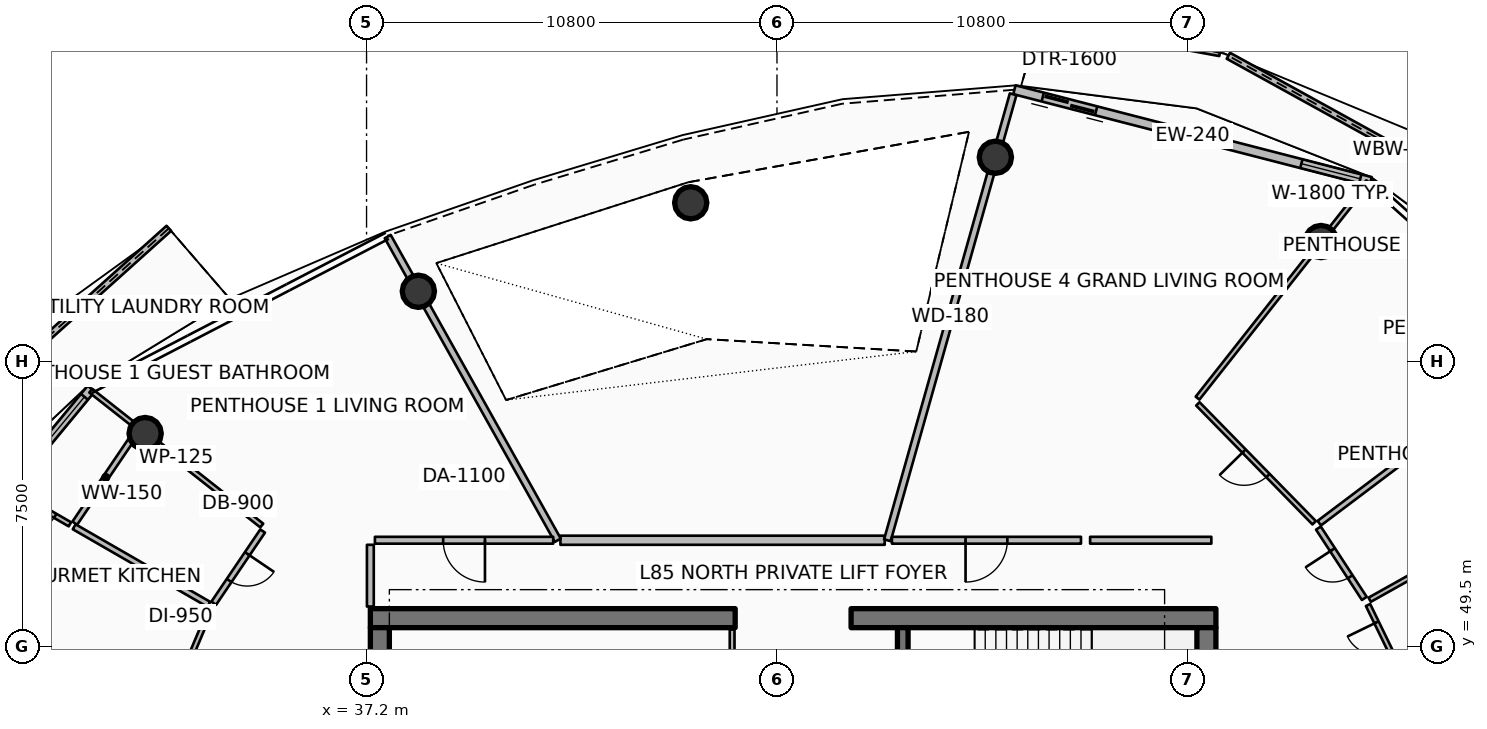
"""IFC4 building model, lengths in metres.
Left out: names, types, materials, properties, quantities, classifications, styles, units other than length and angle.
Written with IfcOpenShell. Run it as: python <this file> out.ifc"""

import sys

from ifc_helpers import new_model, si_unit, direction, frame, frame_2d, origin, origin_2d, place, context, subcontext, project, spatial, polyline, rectangle, circle, outline, extrude, element, fill, save


model = new_model("IFC4")
c1 = context("Model", 3, precision=1e-05, world=origin(), true_north=direction((0.0, 1.0)))
c2 = subcontext(c1, "Body", "Model", "MODEL_VIEW")
j1 = project(units=[si_unit("LENGTHUNIT", "METRE"), si_unit("PLANEANGLEUNIT", "RADIAN")], contexts=[c1])
p1 = place(None, origin())
s1 = spatial("IfcSite", under=j1, at=p1, CompositionType="ELEMENT")
p2 = place(p1, origin())
s2 = spatial("IfcBuilding", under=s1, at=p2, CompositionType="ELEMENT")
p3 = place(p2, frame((0.0, 0.0, 338.9)))
s3 = spatial("IfcBuildingStorey", under=s2, at=p3, CompositionType="ELEMENT", Elevation=338.9)
p4 = place(p3, frame((37.3, 50.25, 0.0), z_axis=(0.0, 0.0, 1.0), x_axis=(1.0, 0.0, 0.0)))
e1 = element("IfcWall", 1, at=p4, inside=s3, PredefinedType="SHEAR", context=c2, shape_type="SweptSolid", body=[
    extrude(rectangle(XDim=9.6, YDim=0.5, at=frame_2d((4.8, 0.0))), origin(), (0.0, 0.0, 1.0), 4.2),
])
p5 = place(p3, frame((49.95, 50.25, 0.0), z_axis=(0.0, 0.0, 1.0), x_axis=(1.0, 0.0, 0.0)))
e2 = element("IfcWall", 2, at=p5, inside=s3, PredefinedType="SHEAR", context=c2, shape_type="SweptSolid", body=[
    extrude(rectangle(XDim=9.6, YDim=0.5, at=frame_2d((4.8, 0.0))), origin(), (0.0, 0.0, 1.0), 4.2),
])
for number, where, z_axis, x_axis in (
    (3, (37.55, 34.0, 0.0), (0.0, 0.0, 1.0), (0.0, 1.0, 0.0)),
    (4, (59.3, 34.0, 0.0), (0.0, 0.0, 1.0), (0.0, 1.0, 0.0)),
):
    element("IfcWall", number, at=place(p3, frame(where, z_axis=z_axis, x_axis=x_axis)), inside=s3, PredefinedType="SHEAR", context=c2, shape_type="SweptSolid", body=[
        extrude(rectangle(XDim=16.0, YDim=0.5, at=frame_2d((8.0, 0.0))), origin(), (0.0, 0.0, 1.0), 4.2),
    ])
p6 = place(p3, frame((51.31, 46.5, 0.0), z_axis=(0.0, 0.0, 1.0), x_axis=(0.0, 1.0, 0.0)))
e5 = element("IfcWall", 5, at=p6, inside=s3, PredefinedType="SHEAR", context=c2, shape_type="SweptSolid", body=[
    extrude(rectangle(XDim=3.5, YDim=0.28, at=frame_2d((1.75, 0.0))), origin(), (0.0, 0.0, 1.0), 4.2),
])
for number, where, z_axis, x_axis in (
    (6, (62.316, 60.159, 0.0), (0.0, 0.0, 1.0), (1.0, 0.0, 0.0)),
    (7, (53.747, 62.376, 0.0), (0.0, 0.0, 1.0), (1.0, 0.0, 0.0)),
    (8, (45.73, 61.179, 0.0), (0.0, 0.0, 1.0), (1.0, 0.0, 0.0)),
    (9, (38.563, 58.851, 0.0), (0.0, 0.0, 1.0), (1.0, 0.0, 0.0)),
    (10, (31.374, 55.107, 0.0), (0.0, 0.0, 1.0), (1.0, 0.0, 0.0)),
):
    element("IfcColumn", number, at=place(p3, frame(where, z_axis=z_axis, x_axis=x_axis)), inside=s3, PredefinedType="COLUMN", context=c2, shape_type="SweptSolid", body=[
        extrude(circle(Radius=0.425, at=origin_2d()), origin(), (0.0, 0.0, 1.0), 3.8),
    ])
p7 = place(p3, frame((68.897, 60.07, 0.0), z_axis=(0.0, 0.0, 1.0), x_axis=(-0.875469817093, 0.483272800145, 0.0)))
e11 = element("IfcWall", 11, at=p7, inside=s3, PredefinedType="PARAPET", context=c2, shape_type="SweptSolid", body=[
    extrude(outline(polyline([(0.0, 0.0), (10.302, 0.0), (10.302, 1.148), (5.151, 1.127), (0.0, 1.224), (0.0, 0.0)])), frame((0.0, 0.09, 0.0), z_axis=(0.0, -1.0, 0.0), x_axis=(1.0, 0.0, 0.0)), (0.0, 0.0, 1.0), 0.18),
])
p8 = place(p3, frame((59.655, 65.128, 0.0), z_axis=(0.0, 0.0, 1.0), x_axis=(-0.983429847583, 0.18128909201, 0.0)))
e12 = element("IfcWall", 12, at=p8, inside=s3, PredefinedType="PARAPET", context=c2, shape_type="SweptSolid", body=[
    extrude(outline(polyline([(0.0, 0.0), (4.808, 0.0), (4.808, 1.279), (0.0, 1.148), (0.0, 0.0)])), frame((0.0, 0.09, 0.0), z_axis=(0.0, -1.0, 0.0), x_axis=(1.0, 0.0, 0.0)), (0.0, 0.0, 1.0), 0.18),
])
p9 = place(p3, frame((31.997, 60.507, 0.0), z_axis=(0.0, 0.0, 1.0), x_axis=(-0.74390919155, -0.668280715514, 0.0)))
e13 = element("IfcWall", 13, at=p9, inside=s3, PredefinedType="PARAPET", context=c2, shape_type="SweptSolid", body=[
    extrude(outline(polyline([(0.0, 0.0), (9.765, 0.0), (9.765, 1.348), (4.883, 1.562), (0.0, 1.747), (0.0, 0.0)])), frame((0.0, 0.09, 0.0), z_axis=(0.0, -1.0, 0.0), x_axis=(1.0, 0.0, 0.0)), (0.0, 0.0, 1.0), 0.18),
])
p10 = place(p3, frame((63.62, 61.74, 0.0), z_axis=(0.0, 0.0, 1.0), x_axis=(-0.968389062354, 0.249444630957, 0.0)))
e14 = element("IfcWall", 14, at=p10, inside=s3, PredefinedType="SOLIDWALL", context=c2, shape_type="SweptSolid", body=[
    extrude(rectangle(XDim=9.678, YDim=0.24, at=frame_2d((4.839, 0.0))), origin(), (0.0, 0.0, 1.0), 2.75),
])
p11 = place(p10, frame((7.458, 0.0, 0.0)))
e15 = element("IfcOpeningElement", 15, at=p11, cuts=e14, PredefinedType="OPENING", context=c2, shape_type="SweptSolid", body=[
    extrude(rectangle(XDim=1.45, YDim=2.15, at=frame_2d((0.725, 1.075))), frame((0.0, 0.13, 0.0), z_axis=(0.0, -1.0, 0.0), x_axis=(1.0, 0.0, 0.0)), (0.0, 0.0, 1.0), 0.26),
])
p12 = place(p10, frame((0.28, 0.0, 0.65)))
e16 = element("IfcOpeningElement", 16, at=p12, cuts=e14, PredefinedType="OPENING", context=c2, shape_type="SweptSolid", body=[
    extrude(rectangle(XDim=1.6, YDim=1.5, at=frame_2d((0.8, 0.75))), frame((0.0, 0.13, 0.0), z_axis=(0.0, -1.0, 0.0), x_axis=(1.0, 0.0, 0.0)), (0.0, 0.0, 1.0), 0.26),
])
p13 = place(p3, frame((29.955, 56.289, 0.0), z_axis=(0.0, 0.0, 1.0), x_axis=(-0.636803612721, -0.771026042897, 0.0)))
e17 = element("IfcWall", 17, at=p13, inside=s3, PredefinedType="SOLIDWALL", context=c2, shape_type="SweptSolid", body=[
    extrude(rectangle(XDim=9.728, YDim=0.24, at=frame_2d((4.864, 0.0))), origin(), (0.0, 0.0, 1.0), 2.75),
])
p14 = place(p13, frame((7.508, 0.0, 0.0)))
e18 = element("IfcOpeningElement", 18, at=p14, cuts=e17, PredefinedType="OPENING", context=c2, shape_type="SweptSolid", body=[
    extrude(rectangle(XDim=1.45, YDim=2.15, at=frame_2d((0.725, 1.075))), frame((0.0, 0.13, 0.0), z_axis=(0.0, -1.0, 0.0), x_axis=(1.0, 0.0, 0.0)), (0.0, 0.0, 1.0), 0.26),
])
p15 = place(p13, frame((0.28, 0.0, 0.65)))
e19 = element("IfcOpeningElement", 19, at=p15, cuts=e17, PredefinedType="OPENING", context=c2, shape_type="SweptSolid", body=[
    extrude(rectangle(XDim=1.6, YDim=1.5, at=frame_2d((0.8, 0.75))), frame((0.0, 0.13, 0.0), z_axis=(0.0, -1.0, 0.0), x_axis=(1.0, 0.0, 0.0)), (0.0, 0.0, 1.0), 0.26),
])
p16 = place(p3, frame((46.82, 47.92, 0.0), z_axis=(0.0, 0.0, 1.0), x_axis=(0.0, 1.0, 0.0)))
e20 = element("IfcWall", 20, at=p16, inside=s3, PredefinedType="PARTITIONING", context=c2, shape_type="SweptSolid", body=[
    extrude(rectangle(XDim=2.03, YDim=0.125, at=frame_2d((1.015, 0.0))), origin(), (0.0, 0.0, 1.0), 3.24),
])
p17 = place(p3, frame((50.835, 52.3, 0.0), z_axis=(0.0, 0.0, 1.0), x_axis=(-1.0, 0.0, 0.0)))
e21 = element("IfcWall", 21, at=p17, inside=s3, PredefinedType="SOLIDWALL", context=c2, shape_type="SweptSolid", body=[
    extrude(rectangle(XDim=8.533, YDim=0.24, at=frame_2d((4.267, 0.0))), origin(), (0.0, 0.0, 1.0), 3.24),
])
p18 = place(p3, frame((50.905, 52.3, 0.0), z_axis=(0.0, 0.0, 1.0), x_axis=(0.271453030279, 0.962451688321, 0.0)))
e22 = element("IfcWall", 22, at=p18, inside=s3, PredefinedType="PARTITIONING", context=c2, shape_type="SweptSolid", body=[
    extrude(rectangle(XDim=12.191, YDim=0.18, at=frame_2d((6.096, 0.0))), origin(), (0.0, 0.0, 1.0), 3.24),
])
p19 = place(p3, frame((42.232, 52.3, 0.0), z_axis=(0.0, 0.0, 1.0), x_axis=(-0.488623665245, 0.872494649704, 0.0)))
e23 = element("IfcWall", 23, at=p19, inside=s3, PredefinedType="PARTITIONING", context=c2, shape_type="SweptSolid", body=[
    extrude(rectangle(XDim=9.157, YDim=0.18, at=frame_2d((4.579, 0.0))), origin(), (0.0, 0.0, 1.0), 3.24),
])
p20 = place(p3, frame((42.112, 52.3, 0.0), z_axis=(0.0, 0.0, 1.0), x_axis=(-1.0, 0.0, 0.0)))
e24 = element("IfcWall", 24, at=p20, inside=s3, PredefinedType="PARTITIONING", context=c2, shape_type="SweptSolid", body=[
    extrude(rectangle(XDim=4.692, YDim=0.18, at=frame_2d((2.346, 0.0))), origin(), (0.0, 0.0, 1.0), 3.24),
])
p21 = place(p20, frame((1.796, 0.0, 0.0)))
e25 = element("IfcOpeningElement", 25, at=p21, cuts=e24, PredefinedType="OPENING", context=c2, shape_type="SweptSolid", body=[
    extrude(rectangle(XDim=1.1, YDim=2.1, at=frame_2d((0.55, 1.05))), frame((0.0, 0.1, 0.0), z_axis=(0.0, -1.0, 0.0), x_axis=(1.0, 0.0, 0.0)), (0.0, 0.0, 1.0), 0.2),
])
p22 = place(p3, frame((37.3, 52.18, 0.0), z_axis=(0.0, 0.0, 1.0), x_axis=(0.0, -1.0, 0.0)))
e26 = element("IfcWall", 26, at=p22, inside=s3, PredefinedType="PARTITIONING", context=c2, shape_type="SweptSolid", body=[
    extrude(rectangle(XDim=1.625, YDim=0.18, at=frame_2d((0.812, 0.0))), origin(), (0.0, 0.0, 1.0), 3.24),
])
p23 = place(p3, frame((34.443, 52.688, 0.0), z_axis=(0.0, 0.0, 1.0), x_axis=(-0.785329715116, 0.61907773224, 0.0)))
e27 = element("IfcWall", 27, at=p23, inside=s3, PredefinedType="PARTITIONING", context=c2, shape_type="SweptSolid", body=[
    extrude(rectangle(XDim=5.73, YDim=0.125, at=frame_2d((2.865, 0.0))), origin(), (0.0, 0.0, 1.0), 3.24),
])
p24 = place(p3, frame((34.466, 52.543, 0.0), z_axis=(0.0, 0.0, 1.0), x_axis=(-0.560627016922, -0.828068443969, 0.0)))
e28 = element("IfcWall", 28, at=p24, inside=s3, PredefinedType="PARTITIONING", context=c2, shape_type="SweptSolid", body=[
    extrude(rectangle(XDim=2.295, YDim=0.15, at=frame_2d((1.147, 0.0))), origin(), (0.0, 0.0, 1.0), 3.24),
])
p25 = place(p24, frame((0.722, 0.0, 0.0)))
e29 = element("IfcOpeningElement", 29, at=p25, cuts=e28, PredefinedType="OPENING", context=c2, shape_type="SweptSolid", body=[
    extrude(rectangle(XDim=0.85, YDim=2.06, at=frame_2d((0.425, 1.03))), frame((0.0, 0.085, 0.0), z_axis=(0.0, -1.0, 0.0), x_axis=(1.0, 0.0, 0.0)), (0.0, 0.0, 1.0), 0.17),
])
p26 = place(p3, frame((31.152, 55.155, 0.0), z_axis=(0.0, 0.0, 1.0), x_axis=(-0.560638207203, -0.828060867705, 0.0)))
e30 = element("IfcWall", 30, at=p26, inside=s3, PredefinedType="PARTITIONING", context=c2, shape_type="SweptSolid", body=[
    extrude(rectangle(XDim=2.906, YDim=0.15, at=frame_2d((1.453, 0.0))), origin(), (0.0, 0.0, 1.0), 3.24),
])
p27 = place(p3, frame((33.051, 50.613, 0.0), z_axis=(0.0, 0.0, 1.0), x_axis=(-0.866485544891, 0.499202163952, 0.0)))
e31 = element("IfcWall", 31, at=p27, inside=s3, PredefinedType="PARTITIONING", context=c2, shape_type="SweptSolid", body=[
    extrude(rectangle(XDim=4.09, YDim=0.15, at=frame_2d((2.045, 0.0))), origin(), (0.0, 0.0, 1.0), 3.24),
])
p28 = place(p3, frame((29.394, 52.719, 0.0), z_axis=(0.0, 0.0, 1.0), x_axis=(-0.866486493133, 0.499200518047, 0.0)))
e32 = element("IfcWall", 32, at=p28, inside=s3, PredefinedType="PARTITIONING", context=c2, shape_type="SweptSolid", body=[
    extrude(rectangle(XDim=1.741, YDim=0.125, at=frame_2d((0.871, 0.0))), origin(), (0.0, 0.0, 1.0), 3.24),
])
p29 = place(p28, frame((0.446, 0.0, 0.0)))
e33 = element("IfcOpeningElement", 33, at=p29, cuts=e32, PredefinedType="OPENING", context=c2, shape_type="SweptSolid", body=[
    extrude(rectangle(XDim=0.85, YDim=2.06, at=frame_2d((0.425, 1.03))), frame((0.0, 0.073, 0.0), z_axis=(0.0, -1.0, 0.0), x_axis=(1.0, 0.0, 0.0)), (0.0, 0.0, 1.0), 0.145),
])
p30 = place(p3, frame((33.094, 50.485, 0.0), z_axis=(0.0, 0.0, 1.0), x_axis=(-0.388261704365, -0.921549157085, 0.0)))
e34 = element("IfcWall", 34, at=p30, inside=s3, PredefinedType="PARTITIONING", context=c2, shape_type="SweptSolid", body=[
    extrude(rectangle(XDim=4.052, YDim=0.125, at=frame_2d((2.026, 0.0))), origin(), (0.0, 0.0, 1.0), 3.24),
])
p31 = place(p30, frame((1.576, 0.0, 0.0)))
e35 = element("IfcOpeningElement", 35, at=p31, cuts=e34, PredefinedType="OPENING", context=c2, shape_type="SweptSolid", body=[
    extrude(rectangle(XDim=0.9, YDim=2.08, at=frame_2d((0.45, 1.04))), frame((0.0, 0.073, 0.0), z_axis=(0.0, -1.0, 0.0), x_axis=(1.0, 0.0, 0.0)), (0.0, 0.0, 1.0), 0.145),
])
p32 = place(p3, frame((56.0, 52.3, 0.0), z_axis=(0.0, 0.0, 1.0), x_axis=(-1.0, 0.0, 0.0)))
e36 = element("IfcWall", 36, at=p32, inside=s3, PredefinedType="PARTITIONING", context=c2, shape_type="SweptSolid", body=[
    extrude(rectangle(XDim=4.975, YDim=0.18, at=frame_2d((2.488, 0.0))), origin(), (0.0, 0.0, 1.0), 3.24),
])
p33 = place(p32, frame((1.938, 0.0, 0.0)))
e37 = element("IfcOpeningElement", 37, at=p33, cuts=e36, PredefinedType="OPENING", context=c2, shape_type="SweptSolid", body=[
    extrude(rectangle(XDim=1.1, YDim=2.1, at=frame_2d((0.55, 1.05))), frame((0.0, 0.1, 0.0), z_axis=(0.0, -1.0, 0.0), x_axis=(1.0, 0.0, 0.0)), (0.0, 0.0, 1.0), 0.2),
])
p34 = place(p3, frame((64.488, 48.88, 0.0), z_axis=(0.0, 0.0, 1.0), x_axis=(0.922882765435, 0.385081032075, 0.0)))
e38 = element("IfcWall", 38, at=p34, inside=s3, PredefinedType="PARTITIONING", context=c2, shape_type="SweptSolid", body=[
    extrude(rectangle(XDim=7.557, YDim=0.125, at=frame_2d((3.778, 0.0))), origin(), (0.0, 0.0, 1.0), 3.24),
])
p35 = place(p3, frame((64.37, 48.917, 0.0), z_axis=(0.0, 0.0, 1.0), x_axis=(-0.437562887643, 0.899187810948, 0.0)))
e39 = element("IfcWall", 39, at=p35, inside=s3, PredefinedType="PARTITIONING", context=c2, shape_type="SweptSolid", body=[
    extrude(rectangle(XDim=1.867, YDim=0.125, at=frame_2d((0.934, 0.0))), origin(), (0.0, 0.0, 1.0), 3.24),
])
p36 = place(p35, frame((0.509, 0.0, 0.0)))
e40 = element("IfcOpeningElement", 40, at=p36, cuts=e39, PredefinedType="OPENING", context=c2, shape_type="SweptSolid", body=[
    extrude(rectangle(XDim=0.85, YDim=2.06, at=frame_2d((0.425, 1.03))), frame((0.0, 0.073, 0.0), z_axis=(0.0, -1.0, 0.0), x_axis=(1.0, 0.0, 0.0)), (0.0, 0.0, 1.0), 0.145),
])
p37 = place(p3, frame((59.43, 52.3, 0.0), z_axis=(0.0, 0.0, 1.0), x_axis=(-1.0, 0.0, 0.0)))
e41 = element("IfcWall", 41, at=p37, inside=s3, PredefinedType="PARTITIONING", context=c2, shape_type="SweptSolid", body=[
    extrude(rectangle(XDim=3.19, YDim=0.18, at=frame_2d((1.595, 0.0))), origin(), (0.0, 0.0, 1.0), 3.24),
])
p38 = place(p3, frame((63.597, 50.735, 0.0), z_axis=(0.0, 0.0, 1.0), x_axis=(0.872502877723, 0.488608972865, 0.0)))
e42 = element("IfcWall", 42, at=p38, inside=s3, PredefinedType="PARTITIONING", context=c2, shape_type="SweptSolid", body=[
    extrude(rectangle(XDim=7.96, YDim=0.125, at=frame_2d((3.98, 0.0))), origin(), (0.0, 0.0, 1.0), 3.24),
])
p39 = place(p3, frame((59.067, 56.038, 0.0), z_axis=(0.0, 0.0, 1.0), x_axis=(0.619090647654, 0.785319533685, 0.0)))
e43 = element("IfcWall", 43, at=p39, inside=s3, PredefinedType="PARTITIONING", context=c2, shape_type="SweptSolid", body=[
    extrude(rectangle(XDim=7.251, YDim=0.125, at=frame_2d((3.625, 0.0))), origin(), (0.0, 0.0, 1.0), 3.24),
])
p40 = place(p3, frame((63.455, 50.77, 0.0), z_axis=(0.0, 0.0, 1.0), x_axis=(-0.546385741331, 0.837533654052, 0.0)))
e44 = element("IfcWall", 44, at=p40, inside=s3, PredefinedType="PARTITIONING", context=c2, shape_type="SweptSolid", body=[
    extrude(rectangle(XDim=2.209, YDim=0.15, at=frame_2d((1.105, 0.0))), origin(), (0.0, 0.0, 1.0), 3.24),
])
p41 = place(p40, frame((0.68, 0.0, 0.0)))
e45 = element("IfcOpeningElement", 45, at=p41, cuts=e44, PredefinedType="OPENING", context=c2, shape_type="SweptSolid", body=[
    extrude(rectangle(XDim=0.85, YDim=2.06, at=frame_2d((0.425, 1.03))), frame((0.0, 0.085, 0.0), z_axis=(0.0, -1.0, 0.0), x_axis=(1.0, 0.0, 0.0)), (0.0, 0.0, 1.0), 0.17),
])
p42 = place(p3, frame((62.27, 52.75, 0.0), z_axis=(0.0, 0.0, 1.0), x_axis=(0.798737068945, 0.601680226278, 0.0)))
e46 = element("IfcWall", 46, at=p42, inside=s3, PredefinedType="PARTITIONING", context=c2, shape_type="SweptSolid", body=[
    extrude(rectangle(XDim=4.46, YDim=0.15, at=frame_2d((2.23, 0.0))), origin(), (0.0, 0.0, 1.0), 3.24),
])
p43 = place(p3, frame((62.135, 52.76, 0.0), z_axis=(0.0, 0.0, 1.0), x_axis=(-0.699310266819, 0.714818264121, 0.0)))
e47 = element("IfcWall", 47, at=p43, inside=s3, PredefinedType="PARTITIONING", context=c2, shape_type="SweptSolid", body=[
    extrude(rectangle(XDim=4.376, YDim=0.125, at=frame_2d((2.188, 0.0))), origin(), (0.0, 0.0, 1.0), 3.24),
])
p44 = place(p43, frame((1.738, 0.0, 0.0)))
e48 = element("IfcOpeningElement", 48, at=p44, cuts=e47, PredefinedType="OPENING", context=c2, shape_type="SweptSolid", body=[
    extrude(rectangle(XDim=0.9, YDim=2.08, at=frame_2d((0.45, 1.04))), frame((0.0, 0.073, 0.0), z_axis=(0.0, -1.0, 0.0), x_axis=(1.0, 0.0, 0.0)), (0.0, 0.0, 1.0), 0.145),
])
p45 = place(p11, origin())
e49 = element("IfcDoor", 49, at=p45, inside=s3, OperationType="DOUBLE_DOOR_SLIDING", PredefinedType="DOOR", context=c2, shape_type="SweptSolid", body=[
    extrude(rectangle(XDim=1.45, YDim=2.15, at=frame_2d((0.725, 1.075))), frame((0.0, 0.025, 0.0), z_axis=(0.0, -1.0, 0.0), x_axis=(1.0, 0.0, 0.0)), (0.0, 0.0, 1.0), 0.05),
])
fill(e15, e49)
p46 = place(p12, origin())
e50 = element("IfcWindow", 50, at=p46, inside=s3, PartitioningType="SINGLE_PANEL", PredefinedType="WINDOW", context=c2, shape_type="SweptSolid", body=[
    extrude(rectangle(XDim=1.6, YDim=1.5, at=frame_2d((0.8, 0.75))), frame((0.0, 0.03, 0.0), z_axis=(0.0, -1.0, 0.0), x_axis=(1.0, 0.0, 0.0)), (0.0, 0.0, 1.0), 0.06),
])
fill(e16, e50)
p47 = place(p15, origin())
e51 = element("IfcWindow", 51, at=p47, inside=s3, PartitioningType="SINGLE_PANEL", PredefinedType="WINDOW", context=c2, shape_type="SweptSolid", body=[
    extrude(rectangle(XDim=1.6, YDim=1.5, at=frame_2d((0.8, 0.75))), frame((0.0, 0.03, 0.0), z_axis=(0.0, -1.0, 0.0), x_axis=(1.0, 0.0, 0.0)), (0.0, 0.0, 1.0), 0.06),
])
fill(e19, e51)
p48 = place(p21, origin())
e52 = element("IfcDoor", 52, at=p48, inside=s3, OperationType="SINGLE_SWING_LEFT", PredefinedType="DOOR", context=c2, shape_type="SweptSolid", body=[
    extrude(rectangle(XDim=1.1, YDim=2.1, at=frame_2d((0.55, 1.05))), frame((0.0, 0.025, 0.0), z_axis=(0.0, -1.0, 0.0), x_axis=(1.0, 0.0, 0.0)), (0.0, 0.0, 1.0), 0.05),
])
fill(e25, e52)
p49 = place(p25, origin())
e53 = element("IfcDoor", 53, at=p49, inside=s3, OperationType="SINGLE_SWING_LEFT", PredefinedType="DOOR", context=c2, shape_type="SweptSolid", body=[
    extrude(rectangle(XDim=0.85, YDim=2.06, at=frame_2d((0.425, 1.03))), frame((0.0, 0.025, 0.0), z_axis=(0.0, -1.0, 0.0), x_axis=(1.0, 0.0, 0.0)), (0.0, 0.0, 1.0), 0.05),
])
fill(e29, e53)
p50 = place(p29, origin())
e54 = element("IfcDoor", 54, at=p50, inside=s3, OperationType="SINGLE_SWING_RIGHT", PredefinedType="DOOR", context=c2, shape_type="SweptSolid", body=[
    extrude(rectangle(XDim=0.85, YDim=2.06, at=frame_2d((0.425, 1.03))), frame((0.0, 0.025, 0.0), z_axis=(0.0, -1.0, 0.0), x_axis=(1.0, 0.0, 0.0)), (0.0, 0.0, 1.0), 0.05),
])
fill(e33, e54)
p51 = place(p33, origin())
e55 = element("IfcDoor", 55, at=p51, inside=s3, OperationType="SINGLE_SWING_RIGHT", PredefinedType="DOOR", context=c2, shape_type="SweptSolid", body=[
    extrude(rectangle(XDim=1.1, YDim=2.1, at=frame_2d((0.55, 1.05))), frame((0.0, 0.025, 0.0), z_axis=(0.0, -1.0, 0.0), x_axis=(1.0, 0.0, 0.0)), (0.0, 0.0, 1.0), 0.05),
])
fill(e37, e55)
p52 = place(p36, origin())
e56 = element("IfcDoor", 56, at=p52, inside=s3, OperationType="SINGLE_SWING_RIGHT", PredefinedType="DOOR", context=c2, shape_type="SweptSolid", body=[
    extrude(rectangle(XDim=0.85, YDim=2.06, at=frame_2d((0.425, 1.03))), frame((0.0, 0.025, 0.0), z_axis=(0.0, -1.0, 0.0), x_axis=(1.0, 0.0, 0.0)), (0.0, 0.0, 1.0), 0.05),
])
fill(e40, e56)
p53 = place(p41, origin())
e57 = element("IfcDoor", 57, at=p53, inside=s3, OperationType="SINGLE_SWING_RIGHT", PredefinedType="DOOR", context=c2, shape_type="SweptSolid", body=[
    extrude(rectangle(XDim=0.85, YDim=2.06, at=frame_2d((0.425, 1.03))), frame((0.0, 0.025, 0.0), z_axis=(0.0, -1.0, 0.0), x_axis=(1.0, 0.0, 0.0)), (0.0, 0.0, 1.0), 0.05),
])
fill(e45, e57)
p54 = place(p44, origin())
e58 = element("IfcDoor", 58, at=p54, inside=s3, OperationType="SINGLE_SWING_RIGHT", PredefinedType="DOOR", context=c2, shape_type="SweptSolid", body=[
    extrude(rectangle(XDim=0.9, YDim=2.08, at=frame_2d((0.45, 1.04))), frame((0.0, 0.025, 0.0), z_axis=(0.0, -1.0, 0.0), x_axis=(1.0, 0.0, 0.0)), (0.0, 0.0, 1.0), 0.05),
])
fill(e48, e58)
save(model, sys.argv[1])
